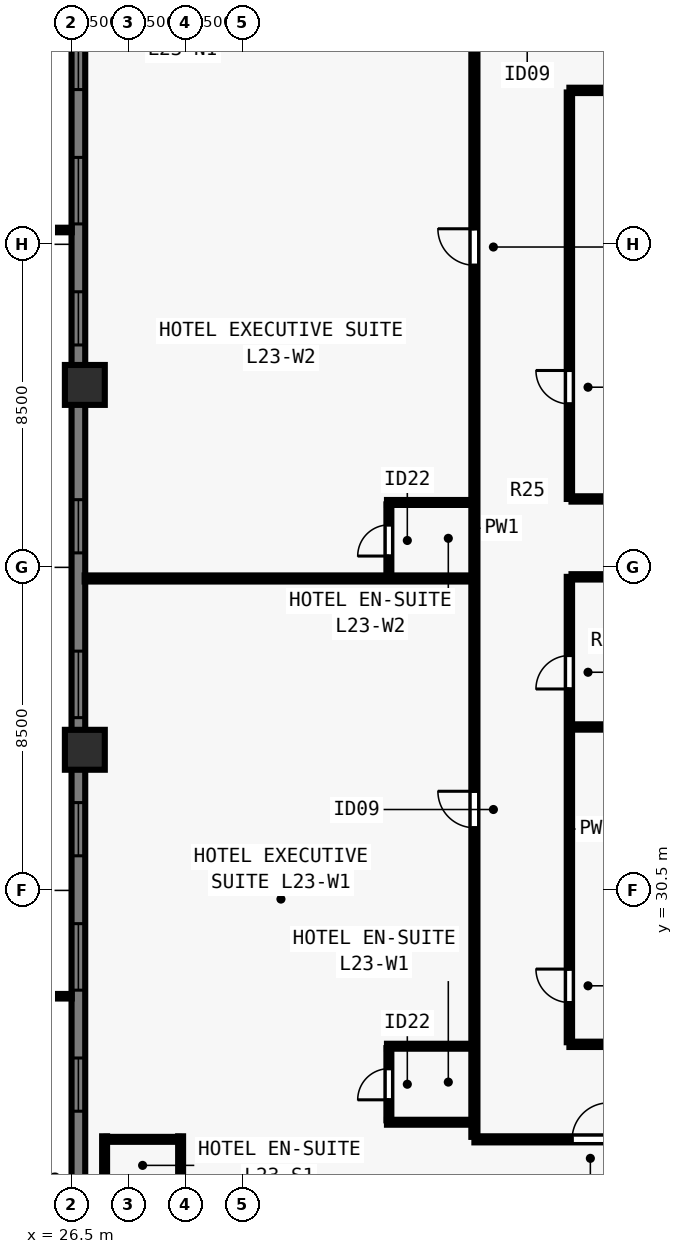
"""IFC4 building model, lengths in metres.
Left out: names, types, materials, properties, quantities, classifications, styles, units other than length and angle.
Written with IfcOpenShell. Run it as: python <this file> out.ifc"""

import sys

from ifc_helpers import new_model, si_unit, direction, frame, frame_2d, origin, origin_2d, place, context, subcontext, project, spatial, rectangle, extrude, element, fill, save


model = new_model("IFC4")
c1 = context("Model", 3, precision=1e-05, world=origin(), true_north=direction((0.0, 1.0)))
c2 = subcontext(c1, "Body", "Model", "MODEL_VIEW")
j1 = project(units=[si_unit("LENGTHUNIT", "METRE"), si_unit("PLANEANGLEUNIT", "RADIAN")], contexts=[c1])
p1 = place(None, origin())
s1 = spatial("IfcSite", under=j1, at=p1, CompositionType="ELEMENT")
p2 = place(p1, origin())
s2 = spatial("IfcBuilding", under=s1, at=p2, CompositionType="ELEMENT")
p3 = place(p2, frame((0.0, 0.0, 86.5)))
s3 = spatial("IfcBuildingStorey", under=s2, at=p3, CompositionType="ELEMENT", Elevation=86.5)
for number, where, z_axis, x_axis in (
    (1, (26.85, 43.8, 0.0), (0.0, 0.0, 1.0), (0.0, 1.0, 0.0)),
    (2, (26.85, 34.2, 0.0), (0.0, 0.0, 1.0), (0.0, 1.0, 0.0)),
):
    element("IfcColumn", number, at=place(p3, frame(where, z_axis=z_axis, x_axis=x_axis)), inside=s3, PredefinedType="COLUMN", context=c2, shape_type="SweptSolid", body=[
        extrude(rectangle(XDim=1.05, YDim=1.05, at=origin_2d()), origin(), (0.0, 0.0, 1.0), 3.5),
    ])
p4 = place(p3, frame((26.68, 16.5, 0.0), z_axis=(0.0, 0.0, 1.0), x_axis=(0.0, 1.0, 0.0)))
e3 = element("IfcWall", 3, at=p4, inside=s3, PredefinedType="SOLIDWALL", context=c2, shape_type="SweptSolid", body=[
    extrude(rectangle(XDim=44.662, YDim=0.36, at=frame_2d((22.331, 0.0))), origin(), (0.0, 0.0, 1.0), 3.28),
])
p5 = place(p4, frame((8.19, 0.0, 0.8)))
e4 = element("IfcOpeningElement", 4, at=p5, cuts=e3, PredefinedType="OPENING", context=c2, shape_type="SweptSolid", body=[
    extrude(rectangle(XDim=1.4, YDim=1.544, at=frame_2d((0.7, 0.772))), frame((0.0, 0.19, 0.0), z_axis=(0.0, -1.0, 0.0), x_axis=(1.0, 0.0, 0.0)), (0.0, 0.0, 1.0), 0.38),
])
p6 = place(p4, frame((11.375, 0.0, 0.8)))
e5 = element("IfcOpeningElement", 5, at=p6, cuts=e3, PredefinedType="OPENING", context=c2, shape_type="SweptSolid", body=[
    extrude(rectangle(XDim=1.75, YDim=1.544, at=frame_2d((0.875, 0.772))), frame((0.0, 0.19, 0.0), z_axis=(0.0, -1.0, 0.0), x_axis=(1.0, 0.0, 0.0)), (0.0, 0.0, 1.0), 0.38),
])
p7 = place(p4, frame((14.911, 0.0, 0.8)))
e6 = element("IfcOpeningElement", 6, at=p7, cuts=e3, PredefinedType="OPENING", context=c2, shape_type="SweptSolid", body=[
    extrude(rectangle(XDim=1.4, YDim=1.544, at=frame_2d((0.7, 0.772))), frame((0.0, 0.19, 0.0), z_axis=(0.0, -1.0, 0.0), x_axis=(1.0, 0.0, 0.0)), (0.0, 0.0, 1.0), 0.38),
])
p8 = place(p4, frame((18.546, 0.0, 0.8)))
e7 = element("IfcOpeningElement", 7, at=p8, cuts=e3, PredefinedType="OPENING", context=c2, shape_type="SweptSolid", body=[
    extrude(rectangle(XDim=1.75, YDim=1.544, at=frame_2d((0.875, 0.772))), frame((0.0, 0.19, 0.0), z_axis=(0.0, -1.0, 0.0), x_axis=(1.0, 0.0, 0.0)), (0.0, 0.0, 1.0), 0.38),
])
p9 = place(p4, frame((22.881, 0.0, 0.8)))
e8 = element("IfcOpeningElement", 8, at=p9, cuts=e3, PredefinedType="OPENING", context=c2, shape_type="SweptSolid", body=[
    extrude(rectangle(XDim=1.4, YDim=1.544, at=frame_2d((0.7, 0.772))), frame((0.0, 0.19, 0.0), z_axis=(0.0, -1.0, 0.0), x_axis=(1.0, 0.0, 0.0)), (0.0, 0.0, 1.0), 0.38),
])
p10 = place(p4, frame((28.351, 0.0, 0.8)))
e9 = element("IfcOpeningElement", 9, at=p10, cuts=e3, PredefinedType="OPENING", context=c2, shape_type="SweptSolid", body=[
    extrude(rectangle(XDim=1.4, YDim=1.544, at=frame_2d((0.7, 0.772))), frame((0.0, 0.19, 0.0), z_axis=(0.0, -1.0, 0.0), x_axis=(1.0, 0.0, 0.0)), (0.0, 0.0, 1.0), 0.38),
])
p11 = place(p4, frame((31.537, 0.0, 0.8)))
e10 = element("IfcOpeningElement", 10, at=p11, cuts=e3, PredefinedType="OPENING", context=c2, shape_type="SweptSolid", body=[
    extrude(rectangle(XDim=1.75, YDim=1.544, at=frame_2d((0.875, 0.772))), frame((0.0, 0.19, 0.0), z_axis=(0.0, -1.0, 0.0), x_axis=(1.0, 0.0, 0.0)), (0.0, 0.0, 1.0), 0.38),
])
p12 = place(p4, frame((35.072, 0.0, 0.8)))
e11 = element("IfcOpeningElement", 11, at=p12, cuts=e3, PredefinedType="OPENING", context=c2, shape_type="SweptSolid", body=[
    extrude(rectangle(XDim=1.4, YDim=1.544, at=frame_2d((0.7, 0.772))), frame((0.0, 0.19, 0.0), z_axis=(0.0, -1.0, 0.0), x_axis=(1.0, 0.0, 0.0)), (0.0, 0.0, 1.0), 0.38),
])
p13 = place(p3, frame((37.1, 23.95, 0.0), z_axis=(0.0, 0.0, 1.0), x_axis=(1.0, 0.0, 0.0)))
e12 = element("IfcWall", 12, at=p13, inside=s3, PredefinedType="PARTITIONING", context=c2, shape_type="SweptSolid", body=[
    extrude(rectangle(XDim=29.8, YDim=0.16, at=frame_2d((14.9, 0.0))), origin(), (0.0, 0.0, 1.0), 3.28),
])
p14 = place(p13, frame((2.571, 0.0, 0.0)))
e13 = element("IfcOpeningElement", 13, at=p14, cuts=e12, PredefinedType="OPENING", context=c2, shape_type="SweptSolid", body=[
    extrude(rectangle(XDim=0.96, YDim=2.15, at=frame_2d((0.48, 1.075))), frame((0.0, 0.09, 0.0), z_axis=(0.0, -1.0, 0.0), x_axis=(1.0, 0.0, 0.0)), (0.0, 0.0, 1.0), 0.18),
])
p15 = place(p13, frame((15.42, 0.0, 0.0)))
e14 = element("IfcOpeningElement", 14, at=p15, cuts=e12, PredefinedType="OPENING", context=c2, shape_type="SweptSolid", body=[
    extrude(rectangle(XDim=0.96, YDim=2.15, at=frame_2d((0.48, 1.075))), frame((0.0, 0.09, 0.0), z_axis=(0.0, -1.0, 0.0), x_axis=(1.0, 0.0, 0.0)), (0.0, 0.0, 1.0), 0.18),
])
p16 = place(p13, frame((27.269, 0.0, 0.0)))
e15 = element("IfcOpeningElement", 15, at=p16, cuts=e12, PredefinedType="OPENING", context=c2, shape_type="SweptSolid", body=[
    extrude(rectangle(XDim=0.96, YDim=2.15, at=frame_2d((0.48, 1.075))), frame((0.0, 0.09, 0.0), z_axis=(0.0, -1.0, 0.0), x_axis=(1.0, 0.0, 0.0)), (0.0, 0.0, 1.0), 0.18),
])
p17 = place(p3, frame((37.1, 24.015, 0.0), z_axis=(0.0, 0.0, 1.0), x_axis=(0.0, 1.0, 0.0)))
e16 = element("IfcWall", 16, at=p17, inside=s3, PredefinedType="PARTITIONING", context=c2, shape_type="SweptSolid", body=[
    extrude(rectangle(XDim=29.97, YDim=0.16, at=frame_2d((14.985, 0.0))), origin(), (0.0, 0.0, 1.0), 3.28),
])
p18 = place(p17, frame((8.134, 0.0, 0.0)))
e17 = element("IfcOpeningElement", 17, at=p18, cuts=e16, PredefinedType="OPENING", context=c2, shape_type="SweptSolid", body=[
    extrude(rectangle(XDim=0.96, YDim=2.15, at=frame_2d((0.48, 1.075))), frame((0.0, 0.09, 0.0), z_axis=(0.0, -1.0, 0.0), x_axis=(1.0, 0.0, 0.0)), (0.0, 0.0, 1.0), 0.18),
])
p19 = place(p17, frame((22.934, 0.0, 0.0)))
e18 = element("IfcOpeningElement", 18, at=p19, cuts=e16, PredefinedType="OPENING", context=c2, shape_type="SweptSolid", body=[
    extrude(rectangle(XDim=0.96, YDim=2.15, at=frame_2d((0.48, 1.075))), frame((0.0, 0.09, 0.0), z_axis=(0.0, -1.0, 0.0), x_axis=(1.0, 0.0, 0.0)), (0.0, 0.0, 1.0), 0.18),
])
p20 = place(p3, frame((39.6, 26.45, 0.0), z_axis=(0.0, 0.0, 1.0), x_axis=(1.0, 0.0, 0.0)))
e19 = element("IfcWall", 19, at=p20, inside=s3, PredefinedType="PARTITIONING", context=c2, shape_type="SweptSolid", body=[
    extrude(rectangle(XDim=24.8, YDim=0.14, at=frame_2d((12.4, 0.0))), origin(), (0.0, 0.0, 1.0), 3.28),
])
p21 = place(p20, frame((1.2, 0.0, 0.0)))
e20 = element("IfcOpeningElement", 20, at=p21, cuts=e19, PredefinedType="OPENING", context=c2, shape_type="SweptSolid", body=[
    extrude(rectangle(XDim=0.88, YDim=2.1, at=frame_2d((0.44, 1.05))), frame((0.0, 0.08, 0.0), z_axis=(0.0, -1.0, 0.0), x_axis=(1.0, 0.0, 0.0)), (0.0, 0.0, 1.0), 0.16),
])
p22 = place(p20, frame((8.9, 0.0, 0.0)))
e21 = element("IfcOpeningElement", 21, at=p22, cuts=e19, PredefinedType="OPENING", context=c2, shape_type="SweptSolid", body=[
    extrude(rectangle(XDim=0.88, YDim=2.1, at=frame_2d((0.44, 1.05))), frame((0.0, 0.08, 0.0), z_axis=(0.0, -1.0, 0.0), x_axis=(1.0, 0.0, 0.0)), (0.0, 0.0, 1.0), 0.16),
])
p23 = place(p20, frame((19.4, 0.0, 0.0)))
e22 = element("IfcOpeningElement", 22, at=p23, cuts=e19, PredefinedType="OPENING", context=c2, shape_type="SweptSolid", body=[
    extrude(rectangle(XDim=0.88, YDim=2.1, at=frame_2d((0.44, 1.05))), frame((0.0, 0.08, 0.0), z_axis=(0.0, -1.0, 0.0), x_axis=(1.0, 0.0, 0.0)), (0.0, 0.0, 1.0), 0.16),
])
p24 = place(p3, frame((39.6, 51.55, 0.0), z_axis=(0.0, 0.0, 1.0), x_axis=(1.0, 0.0, 0.0)))
e23 = element("IfcWall", 23, at=p24, inside=s3, PredefinedType="PARTITIONING", context=c2, shape_type="SweptSolid", body=[
    extrude(rectangle(XDim=24.8, YDim=0.14, at=frame_2d((12.4, 0.0))), origin(), (0.0, 0.0, 1.0), 3.28),
])
p25 = place(p24, frame((2.2, 0.0, 0.0)))
e24 = element("IfcOpeningElement", 24, at=p25, cuts=e23, PredefinedType="OPENING", context=c2, shape_type="SweptSolid", body=[
    extrude(rectangle(XDim=0.88, YDim=2.1, at=frame_2d((0.44, 1.05))), frame((0.0, 0.08, 0.0), z_axis=(0.0, -1.0, 0.0), x_axis=(1.0, 0.0, 0.0)), (0.0, 0.0, 1.0), 0.16),
])
p26 = place(p24, frame((12.9, 0.0, 0.0)))
e25 = element("IfcOpeningElement", 25, at=p26, cuts=e23, PredefinedType="OPENING", context=c2, shape_type="SweptSolid", body=[
    extrude(rectangle(XDim=0.88, YDim=2.1, at=frame_2d((0.44, 1.05))), frame((0.0, 0.08, 0.0), z_axis=(0.0, -1.0, 0.0), x_axis=(1.0, 0.0, 0.0)), (0.0, 0.0, 1.0), 0.16),
])
p27 = place(p24, frame((22.4, 0.0, 0.0)))
e26 = element("IfcOpeningElement", 26, at=p27, cuts=e23, PredefinedType="OPENING", context=c2, shape_type="SweptSolid", body=[
    extrude(rectangle(XDim=0.88, YDim=2.1, at=frame_2d((0.44, 1.05))), frame((0.0, 0.08, 0.0), z_axis=(0.0, -1.0, 0.0), x_axis=(1.0, 0.0, 0.0)), (0.0, 0.0, 1.0), 0.16),
])
p28 = place(p3, frame((39.6, 26.505, 0.0), z_axis=(0.0, 0.0, 1.0), x_axis=(0.0, 1.0, 0.0)))
e27 = element("IfcWall", 27, at=p28, inside=s3, PredefinedType="PARTITIONING", context=c2, shape_type="SweptSolid", body=[
    extrude(rectangle(XDim=12.245, YDim=0.14, at=frame_2d((6.123, 0.0))), origin(), (0.0, 0.0, 1.0), 3.28),
])
p29 = place(p28, frame((1.045, 0.0, 0.0)))
e28 = element("IfcOpeningElement", 28, at=p29, cuts=e27, PredefinedType="OPENING", context=c2, shape_type="SweptSolid", body=[
    extrude(rectangle(XDim=0.88, YDim=2.1, at=frame_2d((0.44, 1.05))), frame((0.0, 0.08, 0.0), z_axis=(0.0, -1.0, 0.0), x_axis=(1.0, 0.0, 0.0)), (0.0, 0.0, 1.0), 0.16),
])
p30 = place(p28, frame((9.295, 0.0, 0.0)))
e29 = element("IfcOpeningElement", 29, at=p30, cuts=e27, PredefinedType="OPENING", context=c2, shape_type="SweptSolid", body=[
    extrude(rectangle(XDim=0.88, YDim=2.1, at=frame_2d((0.44, 1.05))), frame((0.0, 0.08, 0.0), z_axis=(0.0, -1.0, 0.0), x_axis=(1.0, 0.0, 0.0)), (0.0, 0.0, 1.0), 0.16),
])
p31 = place(p3, frame((39.6, 40.8, 0.0), z_axis=(0.0, 0.0, 1.0), x_axis=(0.0, 1.0, 0.0)))
e30 = element("IfcWall", 30, at=p31, inside=s3, PredefinedType="PARTITIONING", context=c2, shape_type="SweptSolid", body=[
    extrude(rectangle(XDim=10.695, YDim=0.14, at=frame_2d((5.348, 0.0))), origin(), (0.0, 0.0, 1.0), 3.28),
])
p32 = place(p31, frame((2.5, 0.0, 0.0)))
e31 = element("IfcOpeningElement", 31, at=p32, cuts=e30, PredefinedType="OPENING", context=c2, shape_type="SweptSolid", body=[
    extrude(rectangle(XDim=0.88, YDim=2.1, at=frame_2d((0.44, 1.05))), frame((0.0, 0.08, 0.0), z_axis=(0.0, -1.0, 0.0), x_axis=(1.0, 0.0, 0.0)), (0.0, 0.0, 1.0), 0.16),
])
for number, where, z_axis, x_axis in (
    (32, (39.655, 38.75, 0.0), (0.0, 0.0, 1.0), (1.0, 0.0, 0.0)),
    (33, (39.655, 40.8, 0.0), (0.0, 0.0, 1.0), (1.0, 0.0, 0.0)),
    (34, (39.655, 34.8, 0.0), (0.0, 0.0, 1.0), (1.0, 0.0, 0.0)),
):
    element("IfcWall", number, at=place(p3, frame(where, z_axis=z_axis, x_axis=x_axis)), inside=s3, PredefinedType="PARTITIONING", context=c2, shape_type="SweptSolid", body=[
        extrude(rectangle(XDim=3.585, YDim=0.14, at=frame_2d((1.792, 0.0))), origin(), (0.0, 0.0, 1.0), 3.28),
    ])
for number, where, z_axis, x_axis in (
    (35, (27.37, 21.65, 0.0), (0.0, 0.0, 1.0), (0.0, 1.0, 0.0)),
    (36, (29.37, 21.65, 0.0), (0.0, 0.0, 1.0), (0.0, 1.0, 0.0)),
):
    element("IfcWall", number, at=place(p3, frame(where, z_axis=z_axis, x_axis=x_axis)), inside=s3, PredefinedType="PLUMBINGWALL", context=c2, shape_type="SweptSolid", body=[
        extrude(rectangle(XDim=2.38, YDim=0.13, at=frame_2d((1.19, 0.0))), origin(), (0.0, 0.0, 1.0), 3.28),
    ])
p33 = place(p3, frame((27.42, 23.95, 0.0), z_axis=(0.0, 0.0, 1.0), x_axis=(1.0, 0.0, 0.0)))
e37 = element("IfcWall", 37, at=p33, inside=s3, PredefinedType="PLUMBINGWALL", context=c2, shape_type="SweptSolid", body=[
    extrude(rectangle(XDim=1.9, YDim=0.13, at=frame_2d((0.95, 0.0))), origin(), (0.0, 0.0, 1.0), 3.28),
])
p34 = place(p3, frame((34.8, 24.4, 0.0), z_axis=(0.0, 0.0, 1.0), x_axis=(1.0, 0.0, 0.0)))
e38 = element("IfcWall", 38, at=p34, inside=s3, PredefinedType="PLUMBINGWALL", context=c2, shape_type="SweptSolid", body=[
    extrude(rectangle(XDim=2.235, YDim=0.13, at=frame_2d((1.117, 0.0))), origin(), (0.0, 0.0, 1.0), 2.849),
])
p35 = place(p3, frame((34.8, 26.4, 0.0), z_axis=(0.0, 0.0, 1.0), x_axis=(1.0, 0.0, 0.0)))
e39 = element("IfcWall", 39, at=p35, inside=s3, PredefinedType="PLUMBINGWALL", context=c2, shape_type="SweptSolid", body=[
    extrude(rectangle(XDim=2.235, YDim=0.13, at=frame_2d((1.117, 0.0))), origin(), (0.0, 0.0, 1.0), 3.28),
])
p36 = place(p3, frame((34.85, 24.45, 0.0), z_axis=(0.0, 0.0, 1.0), x_axis=(0.0, 1.0, 0.0)))
e40 = element("IfcWall", 40, at=p36, inside=s3, PredefinedType="PLUMBINGWALL", context=c2, shape_type="SweptSolid", body=[
    extrude(rectangle(XDim=1.9, YDim=0.13, at=frame_2d((0.95, 0.0))), origin(), (0.0, 0.0, 1.0), 3.28),
])
p37 = place(p36, frame((0.54, 0.0, 0.0)))
e41 = element("IfcOpeningElement", 41, at=p37, cuts=e40, PredefinedType="OPENING", context=c2, shape_type="SweptSolid", body=[
    extrude(rectangle(XDim=0.82, YDim=2.1, at=frame_2d((0.41, 1.05))), frame((0.0, 0.075, 0.0), z_axis=(0.0, -1.0, 0.0), x_axis=(1.0, 0.0, 0.0)), (0.0, 0.0, 1.0), 0.15),
])
p38 = place(p3, frame((26.845, 38.708, 0.0), z_axis=(0.0, 0.0, 1.0), x_axis=(1.0, 0.0, 0.0)))
e42 = element("IfcWall", 42, at=p38, inside=s3, PredefinedType="PARTITIONING", context=c2, shape_type="SweptSolid", body=[
    extrude(rectangle(XDim=10.19, YDim=0.16, at=frame_2d((5.095, 0.0))), origin(), (0.0, 0.0, 1.0), 2.849),
])
p39 = place(p3, frame((34.8, 40.708, 0.0), z_axis=(0.0, 0.0, 1.0), x_axis=(1.0, 0.0, 0.0)))
e43 = element("IfcWall", 43, at=p39, inside=s3, PredefinedType="PLUMBINGWALL", context=c2, shape_type="SweptSolid", body=[
    extrude(rectangle(XDim=2.235, YDim=0.13, at=frame_2d((1.117, 0.0))), origin(), (0.0, 0.0, 1.0), 2.849),
])
p40 = place(p3, frame((34.85, 38.772, 0.0), z_axis=(0.0, 0.0, 1.0), x_axis=(0.0, 1.0, 0.0)))
e44 = element("IfcWall", 44, at=p40, inside=s3, PredefinedType="PLUMBINGWALL", context=c2, shape_type="SweptSolid", body=[
    extrude(rectangle(XDim=1.885, YDim=0.13, at=frame_2d((0.942, 0.0))), origin(), (0.0, 0.0, 1.0), 3.28),
])
p41 = place(p40, frame((0.525, 0.0, 0.0)))
e45 = element("IfcOpeningElement", 45, at=p41, cuts=e44, PredefinedType="OPENING", context=c2, shape_type="SweptSolid", body=[
    extrude(rectangle(XDim=0.82, YDim=2.1, at=frame_2d((0.41, 1.05))), frame((0.0, 0.075, 0.0), z_axis=(0.0, -1.0, 0.0), x_axis=(1.0, 0.0, 0.0)), (0.0, 0.0, 1.0), 0.15),
])
p42 = place(p5, origin())
e46 = element("IfcWindow", 46, at=p42, inside=s3, PartitioningType="SINGLE_PANEL", PredefinedType="WINDOW", context=c2, shape_type="SweptSolid", body=[
    extrude(rectangle(XDim=1.4, YDim=1.544, at=frame_2d((0.7, 0.772))), frame((0.0, -0.05, 0.0), z_axis=(0.0, -1.0, 0.0), x_axis=(1.0, 0.0, 0.0)), (0.0, 0.0, 1.0), 0.06),
])
fill(e4, e46)
p43 = place(p6, origin())
e47 = element("IfcWindow", 47, at=p43, inside=s3, PartitioningType="SINGLE_PANEL", PredefinedType="WINDOW", context=c2, shape_type="SweptSolid", body=[
    extrude(rectangle(XDim=1.75, YDim=1.544, at=frame_2d((0.875, 0.772))), frame((0.0, -0.05, 0.0), z_axis=(0.0, -1.0, 0.0), x_axis=(1.0, 0.0, 0.0)), (0.0, 0.0, 1.0), 0.06),
])
fill(e5, e47)
p44 = place(p7, origin())
e48 = element("IfcWindow", 48, at=p44, inside=s3, PartitioningType="SINGLE_PANEL", PredefinedType="WINDOW", context=c2, shape_type="SweptSolid", body=[
    extrude(rectangle(XDim=1.4, YDim=1.544, at=frame_2d((0.7, 0.772))), frame((0.0, -0.05, 0.0), z_axis=(0.0, -1.0, 0.0), x_axis=(1.0, 0.0, 0.0)), (0.0, 0.0, 1.0), 0.06),
])
fill(e6, e48)
p45 = place(p8, origin())
e49 = element("IfcWindow", 49, at=p45, inside=s3, PartitioningType="SINGLE_PANEL", PredefinedType="WINDOW", context=c2, shape_type="SweptSolid", body=[
    extrude(rectangle(XDim=1.75, YDim=1.544, at=frame_2d((0.875, 0.772))), frame((0.0, -0.05, 0.0), z_axis=(0.0, -1.0, 0.0), x_axis=(1.0, 0.0, 0.0)), (0.0, 0.0, 1.0), 0.06),
])
fill(e7, e49)
p46 = place(p9, origin())
e50 = element("IfcWindow", 50, at=p46, inside=s3, PartitioningType="SINGLE_PANEL", PredefinedType="WINDOW", context=c2, shape_type="SweptSolid", body=[
    extrude(rectangle(XDim=1.4, YDim=1.544, at=frame_2d((0.7, 0.772))), frame((0.0, -0.05, 0.0), z_axis=(0.0, -1.0, 0.0), x_axis=(1.0, 0.0, 0.0)), (0.0, 0.0, 1.0), 0.06),
])
fill(e8, e50)
p47 = place(p10, origin())
e51 = element("IfcWindow", 51, at=p47, inside=s3, PartitioningType="SINGLE_PANEL", PredefinedType="WINDOW", context=c2, shape_type="SweptSolid", body=[
    extrude(rectangle(XDim=1.4, YDim=1.544, at=frame_2d((0.7, 0.772))), frame((0.0, -0.05, 0.0), z_axis=(0.0, -1.0, 0.0), x_axis=(1.0, 0.0, 0.0)), (0.0, 0.0, 1.0), 0.06),
])
fill(e9, e51)
p48 = place(p11, origin())
e52 = element("IfcWindow", 52, at=p48, inside=s3, PartitioningType="SINGLE_PANEL", PredefinedType="WINDOW", context=c2, shape_type="SweptSolid", body=[
    extrude(rectangle(XDim=1.75, YDim=1.544, at=frame_2d((0.875, 0.772))), frame((0.0, -0.05, 0.0), z_axis=(0.0, -1.0, 0.0), x_axis=(1.0, 0.0, 0.0)), (0.0, 0.0, 1.0), 0.06),
])
fill(e10, e52)
p49 = place(p12, origin())
e53 = element("IfcWindow", 53, at=p49, inside=s3, PartitioningType="SINGLE_PANEL", PredefinedType="WINDOW", context=c2, shape_type="SweptSolid", body=[
    extrude(rectangle(XDim=1.4, YDim=1.544, at=frame_2d((0.7, 0.772))), frame((0.0, -0.05, 0.0), z_axis=(0.0, -1.0, 0.0), x_axis=(1.0, 0.0, 0.0)), (0.0, 0.0, 1.0), 0.06),
])
fill(e11, e53)
p50 = place(p29, origin())
e54 = element("IfcDoor", 54, at=p50, inside=s3, OperationType="SINGLE_SWING_RIGHT", PredefinedType="DOOR", context=c2, shape_type="SweptSolid", body=[
    extrude(rectangle(XDim=0.88, YDim=2.1, at=frame_2d((0.44, 1.05))), frame((0.0, 0.025, 0.0), z_axis=(0.0, -1.0, 0.0), x_axis=(1.0, 0.0, 0.0)), (0.0, 0.0, 1.0), 0.05),
])
fill(e28, e54)
p51 = place(p30, origin())
e55 = element("IfcDoor", 55, at=p51, inside=s3, OperationType="SINGLE_SWING_LEFT", PredefinedType="DOOR", context=c2, shape_type="SweptSolid", body=[
    extrude(rectangle(XDim=0.88, YDim=2.1, at=frame_2d((0.44, 1.05))), frame((0.0, 0.025, 0.0), z_axis=(0.0, -1.0, 0.0), x_axis=(1.0, 0.0, 0.0)), (0.0, 0.0, 1.0), 0.05),
])
fill(e29, e55)
p52 = place(p32, origin())
e56 = element("IfcDoor", 56, at=p52, inside=s3, OperationType="SINGLE_SWING_RIGHT", PredefinedType="DOOR", context=c2, shape_type="SweptSolid", body=[
    extrude(rectangle(XDim=0.88, YDim=2.1, at=frame_2d((0.44, 1.05))), frame((0.0, 0.025, 0.0), z_axis=(0.0, -1.0, 0.0), x_axis=(1.0, 0.0, 0.0)), (0.0, 0.0, 1.0), 0.05),
])
fill(e31, e56)
p53 = place(p14, origin())
e57 = element("IfcDoor", 57, at=p53, inside=s3, OperationType="SINGLE_SWING_RIGHT", PredefinedType="DOOR", context=c2, shape_type="SweptSolid", body=[
    extrude(rectangle(XDim=0.96, YDim=2.15, at=frame_2d((0.48, 1.075))), frame((0.0, 0.025, 0.0), z_axis=(0.0, -1.0, 0.0), x_axis=(1.0, 0.0, 0.0)), (0.0, 0.0, 1.0), 0.05),
])
fill(e13, e57)
p54 = place(p37, origin())
e58 = element("IfcDoor", 58, at=p54, inside=s3, OperationType="SINGLE_SWING_LEFT", PredefinedType="DOOR", context=c2, shape_type="SweptSolid", body=[
    extrude(rectangle(XDim=0.82, YDim=2.1, at=frame_2d((0.41, 1.05))), frame((0.0, 0.025, 0.0), z_axis=(0.0, -1.0, 0.0), x_axis=(1.0, 0.0, 0.0)), (0.0, 0.0, 1.0), 0.05),
])
fill(e41, e58)
p55 = place(p18, origin())
e59 = element("IfcDoor", 59, at=p55, inside=s3, OperationType="SINGLE_SWING_RIGHT", PredefinedType="DOOR", context=c2, shape_type="SweptSolid", body=[
    extrude(rectangle(XDim=0.96, YDim=2.15, at=frame_2d((0.48, 1.075))), frame((0.0, 0.025, 0.0), z_axis=(0.0, -1.0, 0.0), x_axis=(1.0, 0.0, 0.0)), (0.0, 0.0, 1.0), 0.05),
])
fill(e17, e59)
p56 = place(p41, origin())
e60 = element("IfcDoor", 60, at=p56, inside=s3, OperationType="SINGLE_SWING_LEFT", PredefinedType="DOOR", context=c2, shape_type="SweptSolid", body=[
    extrude(rectangle(XDim=0.82, YDim=2.1, at=frame_2d((0.41, 1.05))), frame((0.0, 0.025, 0.0), z_axis=(0.0, -1.0, 0.0), x_axis=(1.0, 0.0, 0.0)), (0.0, 0.0, 1.0), 0.05),
])
fill(e45, e60)
p57 = place(p19, origin())
e61 = element("IfcDoor", 61, at=p57, inside=s3, OperationType="SINGLE_SWING_RIGHT", PredefinedType="DOOR", context=c2, shape_type="SweptSolid", body=[
    extrude(rectangle(XDim=0.96, YDim=2.15, at=frame_2d((0.48, 1.075))), frame((0.0, 0.025, 0.0), z_axis=(0.0, -1.0, 0.0), x_axis=(1.0, 0.0, 0.0)), (0.0, 0.0, 1.0), 0.05),
])
fill(e18, e61)
save(model, sys.argv[1])
